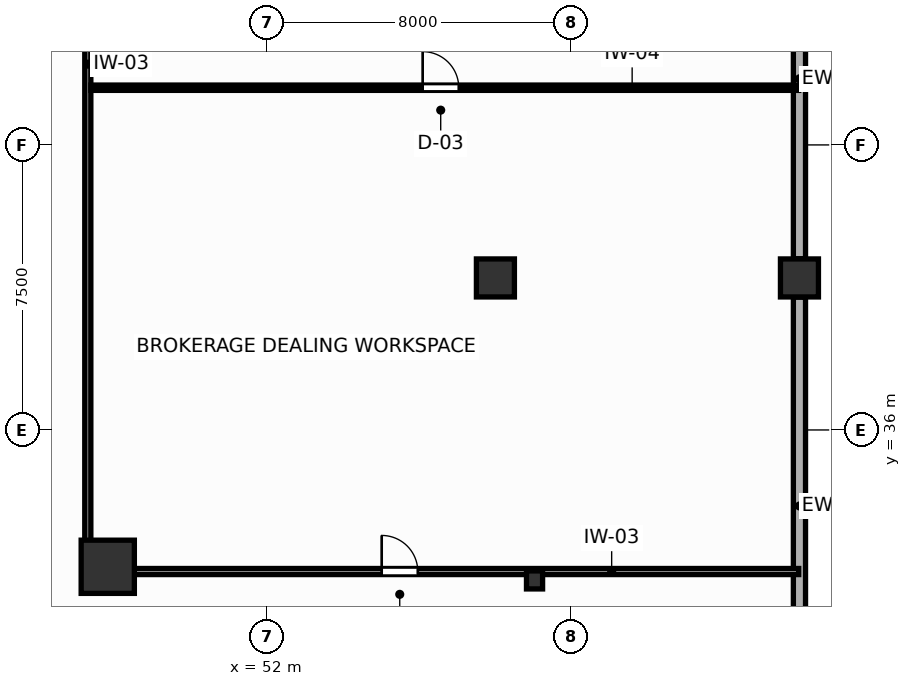
"""IFC4 building model, lengths in metres.
Left out: names, types, materials, properties, quantities, classifications, styles, units other than length and angle.
Written with IfcOpenShell. Run it as: python <this file> out.ifc"""

import sys

from ifc_helpers import new_model, si_unit, direction, frame, frame_2d, origin, origin_2d, place, context, subcontext, project, spatial, rectangle, i_section, extrude, source, transform, mapped, element, fill, save


model = new_model("IFC4")
c1 = context("Model", 3, precision=1e-05, world=origin(), true_north=direction((0.0, 1.0)))
c2 = subcontext(c1, "Body", "Model", "MODEL_VIEW")
j1 = project(units=[si_unit("LENGTHUNIT", "METRE"), si_unit("PLANEANGLEUNIT", "RADIAN")], contexts=[c1])
p1 = place(None, origin())
s1 = spatial("IfcSite", under=j1, at=p1, CompositionType="ELEMENT")
p2 = place(p1, origin())
s2 = spatial("IfcBuilding", under=s1, at=p2, CompositionType="ELEMENT")
p3 = place(p2, frame((0.0, 0.0, 19.2)))
s3 = spatial("IfcBuildingStorey", under=s2, at=p3, CompositionType="ELEMENT", Elevation=19.2)
m1 = source(origin(), c2, "Body", "SweptSolid", [
    extrude(rectangle(XDim=1.4, YDim=1.4, at=origin_2d()), origin(), (0.0, 0.0, 1.0), 4.8),
])
p4 = place(p3, frame((47.8, 32.4, 0.0), z_axis=(0.0, 0.0, 1.0), x_axis=(1.0, 0.0, 0.0)))
e1 = element("IfcColumn", 1, at=p4, inside=s3, PredefinedType="COLUMN", context=c2, shape_type="MappedRepresentation", body=[
    mapped(m1, transform((0.0, 0.0, 0.0), scale=1.0)),
])
m2 = source(origin(), c2, "Body", "SweptSolid", [
    extrude(rectangle(XDim=1.0, YDim=1.0, at=origin_2d()), origin(), (0.0, 0.0, 1.0), 4.8),
])
for number, where, z_axis, x_axis in (
    (2, (66.0, 40.0, 0.0), (0.0, 0.0, 1.0), (1.0, 0.0, 0.0)),
    (3, (58.0, 40.0, 0.0), (0.0, 0.0, 1.0), (1.0, 0.0, 0.0)),
):
    element("IfcColumn", number, at=place(p3, frame(where, z_axis=z_axis, x_axis=x_axis)), inside=s3, PredefinedType="COLUMN", context=c2, shape_type="MappedRepresentation", body=[
        mapped(m2, transform((0.0, 0.0, 0.0), scale=1.0)),
    ])
m3 = source(origin(), c2, "Body", "SweptSolid", [
    extrude(i_section(OverallWidth=0.424, OverallDepth=0.474, WebThickness=0.045, FlangeThickness=0.072, FilletRadius=0.015, at=origin_2d()), origin(), (0.0, 0.0, 1.0), 4.8),
])
p5 = place(p3, frame((59.03, 32.054, 0.0), z_axis=(0.0, 0.0, 1.0), x_axis=(1.0, 0.0, 0.0)))
e4 = element("IfcColumn", 4, at=p5, inside=s3, PredefinedType="COLUMN", context=c2, shape_type="MappedRepresentation", body=[
    mapped(m3, transform((0.0, 0.0, 0.0), scale=1.0)),
])
p6 = place(p3, frame((66.0, 28.505, 0.0), z_axis=(0.0, 0.0, 1.0), x_axis=(0.0, 1.0, 0.0)))
e5 = element("IfcWall", 5, at=p6, inside=s3, PredefinedType="SOLIDWALL", context=c2, shape_type="SweptSolid", body=[
    extrude(rectangle(XDim=10.99, YDim=0.32, at=frame_2d((5.495, 0.0))), origin(), (0.0, 0.0, 1.0), 3.88),
])
p7 = place(p3, frame((66.0, 40.505, 0.0), z_axis=(0.0, 0.0, 1.0), x_axis=(0.0, 1.0, 0.0)))
e6 = element("IfcWall", 6, at=p7, inside=s3, PredefinedType="SOLIDWALL", context=c2, shape_type="SweptSolid", body=[
    extrude(rectangle(XDim=9.47, YDim=0.32, at=frame_2d((4.735, 0.0))), origin(), (0.0, 0.0, 1.0), 3.88),
])
p8 = place(p3, frame((47.275, 32.27, 0.0), z_axis=(0.0, 0.0, 1.0), x_axis=(0.0, 1.0, 0.0)))
e7 = element("IfcWall", 7, at=p8, inside=s3, PredefinedType="PARTITIONING", context=c2, shape_type="SweptSolid", body=[
    extrude(rectangle(XDim=26.71, YDim=0.16, at=frame_2d((13.355, 0.0))), origin(), (0.0, 0.0, 1.0), 4.58),
])
p9 = place(p3, frame((47.357, 32.275, 0.0), z_axis=(0.0, 0.0, 1.0), x_axis=(1.0, 0.0, 0.0)))
e8 = element("IfcWall", 8, at=p9, inside=s3, PredefinedType="PARTITIONING", context=c2, shape_type="SweptSolid", body=[
    extrude(rectangle(XDim=18.623, YDim=0.16, at=frame_2d((9.312, 0.0))), origin(), (0.0, 0.0, 1.0), 3.88),
])
p10 = place(p9, frame((7.651, 0.0, 0.0)))
e9 = element("IfcOpeningElement", 9, at=p10, cuts=e8, PredefinedType="OPENING", context=c2, shape_type="SweptSolid", body=[
    extrude(rectangle(XDim=0.95, YDim=2.05, at=frame_2d((0.475, 1.025))), frame((0.0, 0.09, 0.0), z_axis=(0.0, -1.0, 0.0), x_axis=(1.0, 0.0, 0.0)), (0.0, 0.0, 1.0), 0.18),
])
p11 = place(p3, frame((47.357, 45.005, 0.0), z_axis=(0.0, 0.0, 1.0), x_axis=(1.0, 0.0, 0.0)))
e10 = element("IfcWall", 10, at=p11, inside=s3, PredefinedType="PARTITIONING", context=c2, shape_type="SweptSolid", body=[
    extrude(rectangle(XDim=18.623, YDim=0.14, at=frame_2d((9.312, 0.0))), origin(), (0.0, 0.0, 1.0), 4.58),
])
p12 = place(p11, frame((8.729, 0.0, 0.0)))
e11 = element("IfcOpeningElement", 11, at=p12, cuts=e10, PredefinedType="OPENING", context=c2, shape_type="SweptSolid", body=[
    extrude(rectangle(XDim=0.95, YDim=2.05, at=frame_2d((0.475, 1.025))), frame((0.0, 0.08, 0.0), z_axis=(0.0, -1.0, 0.0), x_axis=(1.0, 0.0, 0.0)), (0.0, 0.0, 1.0), 0.16),
])
p13 = place(p10, origin())
e12 = element("IfcDoor", 12, at=p13, inside=s3, OperationType="SINGLE_SWING_LEFT", PredefinedType="DOOR", context=c2, shape_type="SweptSolid", body=[
    extrude(rectangle(XDim=0.95, YDim=2.05, at=frame_2d((0.475, 1.025))), frame((0.0, 0.025, 0.0), z_axis=(0.0, -1.0, 0.0), x_axis=(1.0, 0.0, 0.0)), (0.0, 0.0, 1.0), 0.05),
])
fill(e9, e12)
p14 = place(p12, origin())
e13 = element("IfcDoor", 13, at=p14, inside=s3, OperationType="SINGLE_SWING_LEFT", PredefinedType="DOOR", context=c2, shape_type="SweptSolid", body=[
    extrude(rectangle(XDim=0.95, YDim=2.05, at=frame_2d((0.475, 1.025))), frame((0.0, 0.025, 0.0), z_axis=(0.0, -1.0, 0.0), x_axis=(1.0, 0.0, 0.0)), (0.0, 0.0, 1.0), 0.05),
])
fill(e11, e13)
save(model, sys.argv[1])
